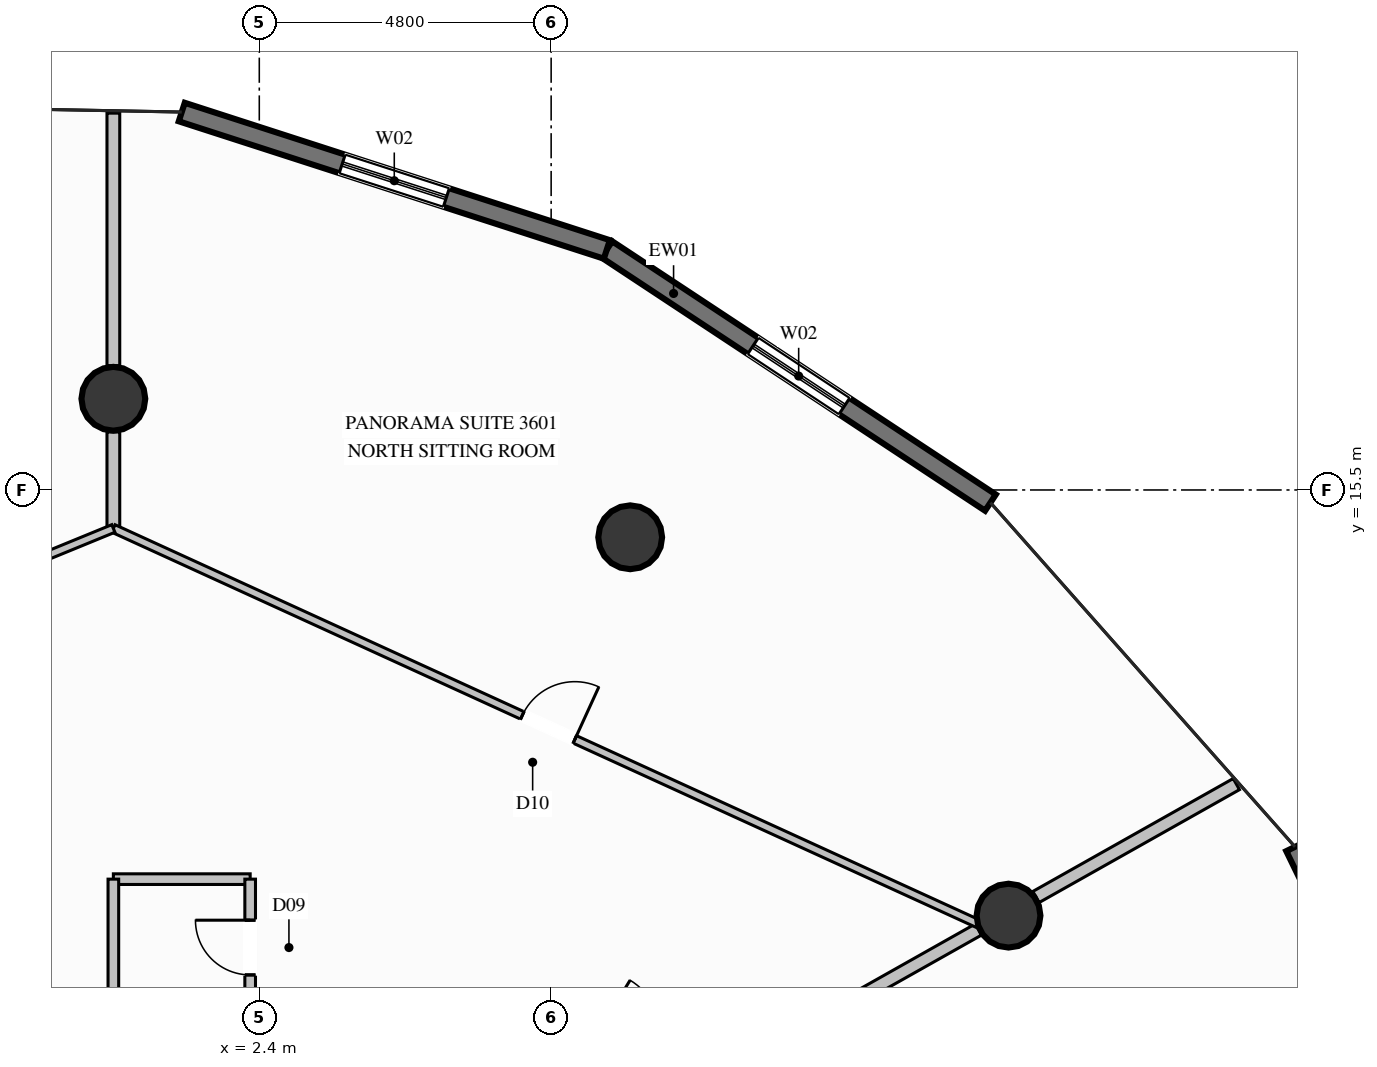
"""IFC4 building model, lengths in metres.
Left out: names, types, materials, properties, quantities, classifications, styles, units other than length and angle.
Written with IfcOpenShell. Run it as: python <this file> out.ifc"""

import sys

from ifc_helpers import new_model, si_unit, direction, frame, frame_2d, origin, origin_2d, place, context, subcontext, project, spatial, rectangle, circle, extrude, element, fill, save


model = new_model("IFC4")
c1 = context("Model", 3, precision=1e-05, world=origin(), true_north=direction((0.0, 1.0)))
c2 = subcontext(c1, "Body", "Model", "MODEL_VIEW")
j1 = project(units=[si_unit("LENGTHUNIT", "METRE"), si_unit("PLANEANGLEUNIT", "RADIAN")], contexts=[c1])
p1 = place(None, origin())
s1 = spatial("IfcSite", under=j1, at=p1, CompositionType="ELEMENT")
p2 = place(p1, origin())
s2 = spatial("IfcBuilding", under=s1, at=p2, CompositionType="ELEMENT")
p3 = place(p2, frame((0.0, 0.0, 135.0)))
s3 = spatial("IfcBuildingStorey", under=s2, at=p3, CompositionType="ELEMENT", Elevation=135.0)
for number, where, z_axis, x_axis in (
    (1, (14.722, 8.5, 0.0), (0.0, 0.0, 1.0), (1.0, 0.0, 0.0)),
    (2, (8.5, 14.722, 0.0), (0.0, 0.0, 1.0), (1.0, 0.0, 0.0)),
    (3, (0.0, 17.0, 0.0), (0.0, 0.0, 1.0), (1.0, 0.0, 0.0)),
):
    element("IfcColumn", number, at=place(p3, frame(where, z_axis=z_axis, x_axis=x_axis)), inside=s3, PredefinedType="COLUMN", context=c2, shape_type="SweptSolid", body=[
        extrude(circle(Radius=0.525, at=origin_2d()), origin(), (0.0, 0.0, 1.0), 3.6),
    ])
p4 = place(p3, frame((19.434, 9.631, 0.0), z_axis=(0.0, 0.0, 1.0), x_axis=(0.438204261182, -0.898875422671, 0.0)))
e4 = element("IfcWall", 4, at=p4, inside=s3, PredefinedType="SOLIDWALL", context=c2, shape_type="SweptSolid", body=[
    extrude(rectangle(XDim=7.346, YDim=0.32, at=frame_2d((3.673, 0.0))), origin(), (0.0, 0.0, 1.0), 3.35),
])
p5 = place(p4, frame((2.773, 0.0, 0.35)))
e5 = element("IfcOpeningElement", 5, at=p5, cuts=e4, PredefinedType="OPENING", context=c2, shape_type="SweptSolid", body=[
    extrude(rectangle(XDim=1.8, YDim=2.6, at=frame_2d((0.9, 1.3))), frame((0.0, 0.17, 0.0), z_axis=(0.0, -1.0, 0.0), x_axis=(1.0, 0.0, 0.0)), (0.0, 0.0, 1.0), 0.34),
])
p6 = place(p3, frame((8.116, 19.456, 0.0), z_axis=(0.0, 0.0, 1.0), x_axis=(0.834605249122, -0.550848507431, 0.0)))
e6 = element("IfcWall", 6, at=p6, inside=s3, PredefinedType="SOLIDWALL", context=c2, shape_type="SweptSolid", body=[
    extrude(rectangle(XDim=7.559, YDim=0.32, at=frame_2d((3.78, 0.0))), origin(), (0.0, 0.0, 1.0), 3.35),
])
p7 = place(p6, frame((2.88, 0.0, 0.35)))
e7 = element("IfcOpeningElement", 7, at=p7, cuts=e6, PredefinedType="OPENING", context=c2, shape_type="SweptSolid", body=[
    extrude(rectangle(XDim=1.8, YDim=2.6, at=frame_2d((0.9, 1.3))), frame((0.0, 0.17, 0.0), z_axis=(0.0, -1.0, 0.0), x_axis=(1.0, 0.0, 0.0)), (0.0, 0.0, 1.0), 0.34),
])
p8 = place(p3, frame((1.125, 21.715, 0.0), z_axis=(0.0, 0.0, 1.0), x_axis=(0.951554090089, -0.307481403722, 0.0)))
e8 = element("IfcWall", 8, at=p8, inside=s3, PredefinedType="SOLIDWALL", context=c2, shape_type="SweptSolid", body=[
    extrude(rectangle(XDim=7.347, YDim=0.32, at=frame_2d((3.673, 0.0))), origin(), (0.0, 0.0, 1.0), 3.35),
])
p9 = place(p8, frame((2.773, 0.0, 0.35)))
e9 = element("IfcOpeningElement", 9, at=p9, cuts=e8, PredefinedType="OPENING", context=c2, shape_type="SweptSolid", body=[
    extrude(rectangle(XDim=1.8, YDim=2.6, at=frame_2d((0.9, 1.3))), frame((0.0, 0.17, 0.0), z_axis=(0.0, -1.0, 0.0), x_axis=(1.0, 0.0, 0.0)), (0.0, 0.0, 1.0), 0.34),
])
p10 = place(p3, frame((9.44, 5.575, 0.0), z_axis=(0.0, 0.0, 1.0), x_axis=(0.871243078021, 0.490851809613, 0.0)))
e10 = element("IfcWall", 10, at=p10, inside=s3, PredefinedType="PARTITIONING", context=c2, shape_type="SweptSolid", body=[
    extrude(rectangle(XDim=5.495, YDim=0.21, at=frame_2d((2.747, 0.0))), origin(), (0.0, 0.0, 1.0), 2.717),
])
p11 = place(p3, frame((15.173, 8.806, 0.0), z_axis=(0.0, 0.0, 1.0), x_axis=(0.871209921186, 0.490910657071, 0.0)))
e11 = element("IfcWall", 11, at=p11, inside=s3, PredefinedType="PARTITIONING", context=c2, shape_type="SweptSolid", body=[
    extrude(rectangle(XDim=3.783, YDim=0.21, at=frame_2d((1.892, 0.0))), origin(), (0.0, 0.0, 1.0), 3.35),
])
for number, where, z_axis, x_axis in (
    (12, (0.0, 9.1, 0.0), (0.0, 0.0, 1.0), (1.0, 0.0, 0.0)),
    (13, (0.0, 9.1, 0.0), (0.0, 0.0, 1.0), (0.0, -1.0, 0.0)),
):
    element("IfcWall", number, at=place(p3, frame(where, z_axis=z_axis, x_axis=x_axis)), inside=s3, PredefinedType="PLUMBINGWALL", context=c2, shape_type="SweptSolid", body=[
        extrude(rectangle(XDim=2.25, YDim=0.175, at=frame_2d((1.125, 0.0))), origin(), (0.0, 0.0, 1.0), 3.35),
    ])
p12 = place(p3, frame((2.25, 6.85, 0.0), z_axis=(0.0, 0.0, 1.0), x_axis=(0.0, 1.0, 0.0)))
e14 = element("IfcWall", 14, at=p12, inside=s3, PredefinedType="PLUMBINGWALL", context=c2, shape_type="SweptSolid", body=[
    extrude(rectangle(XDim=2.25, YDim=0.175, at=frame_2d((1.125, 0.0))), origin(), (0.0, 0.0, 1.0), 3.35),
])
p13 = place(p12, frame((0.675, 0.0, 0.0)))
e15 = element("IfcOpeningElement", 15, at=p13, cuts=e14, PredefinedType="OPENING", context=c2, shape_type="SweptSolid", body=[
    extrude(rectangle(XDim=0.9, YDim=2.1, at=frame_2d((0.45, 1.05))), frame((0.0, 0.098, 0.0), z_axis=(0.0, -1.0, 0.0), x_axis=(1.0, 0.0, 0.0)), (0.0, 0.0, 1.0), 0.195),
])
p14 = place(p3, frame((0.0, 14.867, 0.0), z_axis=(0.0, 0.0, 1.0), x_axis=(0.0, 1.0, 0.0)))
e16 = element("IfcWall", 16, at=p14, inside=s3, PredefinedType="PARTITIONING", context=c2, shape_type="SweptSolid", body=[
    extrude(rectangle(XDim=1.588, YDim=0.21, at=frame_2d((0.794, 0.0))), origin(), (0.0, 0.0, 1.0), 3.35),
])
p15 = place(p3, frame((0.0, 17.545, 0.0), z_axis=(0.0, 0.0, 1.0), x_axis=(0.0, 1.0, 0.0)))
e17 = element("IfcWall", 17, at=p15, inside=s3, PredefinedType="PARTITIONING", context=c2, shape_type="SweptSolid", body=[
    extrude(rectangle(XDim=4.152, YDim=0.21, at=frame_2d((2.076, 0.0))), origin(), (0.0, 0.0, 1.0), 3.35),
])
p16 = place(p3, frame((0.0, 14.867, 0.0), z_axis=(0.0, 0.0, 1.0), x_axis=(0.909485869623, -0.415734834909, 0.0)))
e18 = element("IfcWall", 18, at=p16, inside=s3, PredefinedType="PARTITIONING", context=c2, shape_type="SweptSolid", body=[
    extrude(rectangle(XDim=15.741, YDim=0.135, at=frame_2d((7.87, 0.0))), origin(), (0.0, 0.0, 1.0), 2.878),
])
p17 = place(p16, frame((7.395, 0.0, 0.0)))
e19 = element("IfcOpeningElement", 19, at=p17, cuts=e18, PredefinedType="OPENING", context=c2, shape_type="SweptSolid", body=[
    extrude(rectangle(XDim=0.95, YDim=2.1, at=frame_2d((0.475, 1.05))), frame((0.0, 0.078, 0.0), z_axis=(0.0, -1.0, 0.0), x_axis=(1.0, 0.0, 0.0)), (0.0, 0.0, 1.0), 0.155),
])
p18 = place(p3, frame((-15.001, 8.718, 0.0), z_axis=(0.0, 0.0, 1.0), x_axis=(0.925283827326, 0.379275412978, 0.0)))
e20 = element("IfcWall", 20, at=p18, inside=s3, PredefinedType="PARTITIONING", context=c2, shape_type="SweptSolid", body=[
    extrude(rectangle(XDim=16.212, YDim=0.135, at=frame_2d((8.106, 0.0))), origin(), (0.0, 0.0, 1.0), 2.806),
])
p19 = place(p18, frame((7.631, 0.0, 0.0)))
e21 = element("IfcOpeningElement", 21, at=p19, cuts=e20, PredefinedType="OPENING", context=c2, shape_type="SweptSolid", body=[
    extrude(rectangle(XDim=0.95, YDim=2.1, at=frame_2d((0.475, 1.05))), frame((0.0, 0.078, 0.0), z_axis=(0.0, -1.0, 0.0), x_axis=(1.0, 0.0, 0.0)), (0.0, 0.0, 1.0), 0.155),
])
p20 = place(p7, origin())
e22 = element("IfcWindow", 22, at=p20, inside=s3, PartitioningType="SINGLE_PANEL", PredefinedType="WINDOW", context=c2, shape_type="SweptSolid", body=[
    extrude(rectangle(XDim=1.8, YDim=2.6, at=frame_2d((0.9, 1.3))), frame((0.0, 0.03, 0.0), z_axis=(0.0, -1.0, 0.0), x_axis=(1.0, 0.0, 0.0)), (0.0, 0.0, 1.0), 0.06),
])
fill(e7, e22)
p21 = place(p9, origin())
e23 = element("IfcWindow", 23, at=p21, inside=s3, PartitioningType="SINGLE_PANEL", PredefinedType="WINDOW", context=c2, shape_type="SweptSolid", body=[
    extrude(rectangle(XDim=1.8, YDim=2.6, at=frame_2d((0.9, 1.3))), frame((0.0, 0.03, 0.0), z_axis=(0.0, -1.0, 0.0), x_axis=(1.0, 0.0, 0.0)), (0.0, 0.0, 1.0), 0.06),
])
fill(e9, e23)
p22 = place(p13, origin())
e24 = element("IfcDoor", 24, at=p22, inside=s3, OperationType="SINGLE_SWING_RIGHT", PredefinedType="DOOR", context=c2, shape_type="SweptSolid", body=[
    extrude(rectangle(XDim=0.9, YDim=2.1, at=frame_2d((0.45, 1.05))), frame((0.0, 0.025, 0.0), z_axis=(0.0, -1.0, 0.0), x_axis=(1.0, 0.0, 0.0)), (0.0, 0.0, 1.0), 0.05),
])
fill(e15, e24)
p23 = place(p17, origin())
e25 = element("IfcDoor", 25, at=p23, inside=s3, OperationType="SINGLE_SWING_RIGHT", PredefinedType="DOOR", context=c2, shape_type="SweptSolid", body=[
    extrude(rectangle(XDim=0.95, YDim=2.1, at=frame_2d((0.475, 1.05))), frame((0.0, 0.025, 0.0), z_axis=(0.0, -1.0, 0.0), x_axis=(1.0, 0.0, 0.0)), (0.0, 0.0, 1.0), 0.05),
])
fill(e19, e25)
save(model, sys.argv[1])
